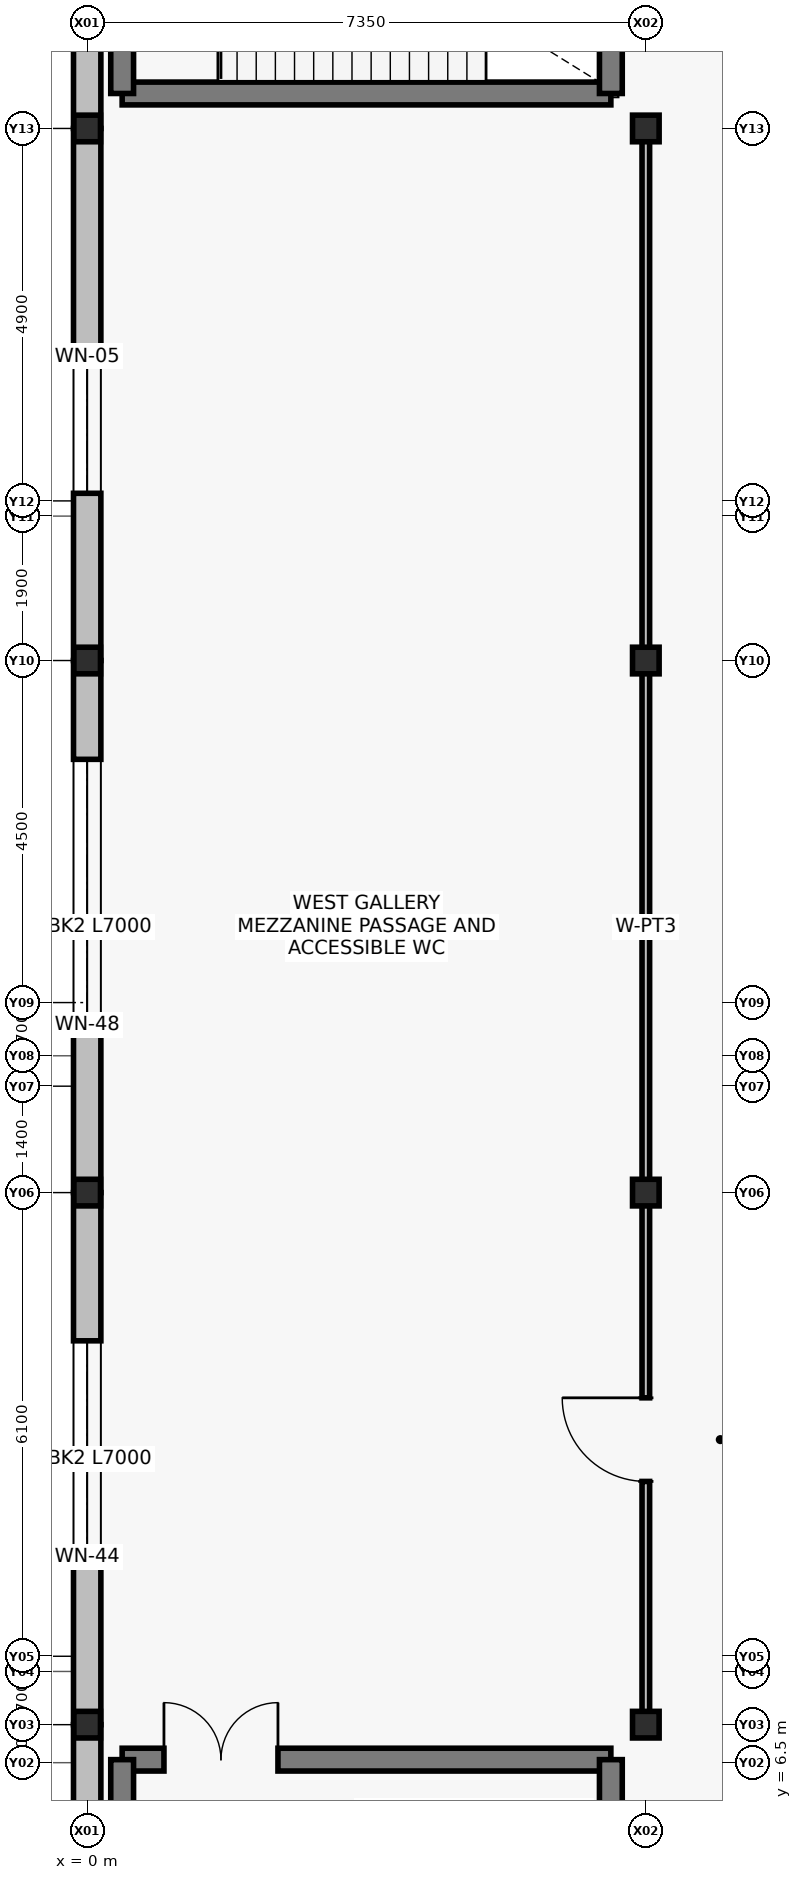
"""IFC4 building model, lengths in metres.
Left out: names, types, materials, properties, quantities, classifications, styles, units other than length and angle.
Written with IfcOpenShell. Run it as: python <this file> out.ifc"""

import sys

from ifc_helpers import new_model, si_unit, direction, frame, frame_2d, origin, origin_2d, place, context, subcontext, project, spatial, rectangle, i_section, extrude, element, fill, save


model = new_model("IFC4")
c1 = context("Model", 3, precision=1e-05, world=origin(), true_north=direction((0.0, 1.0)))
c2 = subcontext(c1, "Body", "Model", "MODEL_VIEW")
j1 = project(units=[si_unit("LENGTHUNIT", "METRE"), si_unit("PLANEANGLEUNIT", "RADIAN")], contexts=[c1])
p1 = place(None, origin())
s1 = spatial("IfcSite", under=j1, at=p1, CompositionType="ELEMENT")
p2 = place(p1, origin())
s2 = spatial("IfcBuilding", under=s1, at=p2, CompositionType="ELEMENT")
p3 = place(p2, frame((0.0, 0.0, 6.0)))
s3 = spatial("IfcBuildingStorey", under=s2, at=p3, CompositionType="ELEMENT", Elevation=6.0)
for number, where, z_axis, x_axis in (
    (1, (0.0, 7.0, 0.0), (0.0, 0.0, 1.0), (1.0, 0.0, 0.0)),
    (2, (0.0, 14.0, 0.0), (0.0, 0.0, 1.0), (1.0, 0.0, 0.0)),
    (3, (0.0, 21.0, 0.0), (0.0, 0.0, 1.0), (1.0, 0.0, 0.0)),
    (4, (0.0, 28.0, 0.0), (0.0, 0.0, 1.0), (1.0, 0.0, 0.0)),
    (5, (7.35, 7.0, 0.0), (0.0, 0.0, 1.0), (1.0, 0.0, 0.0)),
    (6, (7.35, 14.0, 0.0), (0.0, 0.0, 1.0), (1.0, 0.0, 0.0)),
    (7, (7.35, 21.0, 0.0), (0.0, 0.0, 1.0), (1.0, 0.0, 0.0)),
    (8, (7.35, 28.0, 0.0), (0.0, 0.0, 1.0), (1.0, 0.0, 0.0)),
):
    element("IfcColumn", number, at=place(p3, frame(where, z_axis=z_axis, x_axis=x_axis)), inside=s3, PredefinedType="COLUMN", context=c2, shape_type="SweptSolid", body=[
        extrude(i_section(OverallWidth=0.35, OverallDepth=0.35, WebThickness=0.012, FlangeThickness=0.019, at=origin_2d()), origin(), (0.0, 0.0, 1.0), 5.1),
    ])
p4 = place(p3, frame((0.0, 0.0, 0.0), z_axis=(0.0, 0.0, 1.0), x_axis=(0.0, 1.0, 0.0)))
e9 = element("IfcWall", 9, at=p4, inside=s3, PredefinedType="SOLIDWALL", context=c2, shape_type="SweptSolid", body=[
    extrude(rectangle(XDim=7.0, YDim=0.36, at=frame_2d((3.5, 0.0))), origin(), (0.0, 0.0, 1.0), 4.25),
])
p5 = place(p4, frame((2.2, 0.0, 0.95)))
e10 = element("IfcOpeningElement", 10, at=p5, cuts=e9, PredefinedType="OPENING", context=c2, shape_type="SweptSolid", body=[
    extrude(rectangle(XDim=2.15, YDim=1.9, at=frame_2d((1.075, 0.95))), frame((0.0, 0.19, 0.0), z_axis=(0.0, -1.0, 0.0), x_axis=(1.0, 0.0, 0.0)), (0.0, 0.0, 1.0), 0.38),
])
p6 = place(p3, frame((0.0, 7.0, 0.0), z_axis=(0.0, 0.0, 1.0), x_axis=(0.0, 1.0, 0.0)))
e11 = element("IfcWall", 11, at=p6, inside=s3, PredefinedType="SOLIDWALL", context=c2, shape_type="SweptSolid", body=[
    extrude(rectangle(XDim=7.0, YDim=0.36, at=frame_2d((3.5, 0.0))), origin(), (0.0, 0.0, 1.0), 4.25),
])
p7 = place(p6, frame((2.2, 0.0, 0.95)))
e12 = element("IfcOpeningElement", 12, at=p7, cuts=e11, PredefinedType="OPENING", context=c2, shape_type="SweptSolid", body=[
    extrude(rectangle(XDim=2.85, YDim=1.85, at=frame_2d((1.425, 0.925))), frame((0.0, 0.19, 0.0), z_axis=(0.0, -1.0, 0.0), x_axis=(1.0, 0.0, 0.0)), (0.0, 0.0, 1.0), 0.38),
])
p8 = place(p3, frame((0.0, 14.0, 0.0), z_axis=(0.0, 0.0, 1.0), x_axis=(0.0, 1.0, 0.0)))
e13 = element("IfcWall", 13, at=p8, inside=s3, PredefinedType="SOLIDWALL", context=c2, shape_type="SweptSolid", body=[
    extrude(rectangle(XDim=7.0, YDim=0.36, at=frame_2d((3.5, 0.0))), origin(), (0.0, 0.0, 1.0), 4.25),
])
p9 = place(p8, frame((2.2, 0.0, 0.95)))
e14 = element("IfcOpeningElement", 14, at=p9, cuts=e13, PredefinedType="OPENING", context=c2, shape_type="SweptSolid", body=[
    extrude(rectangle(XDim=3.5, YDim=2.0, at=frame_2d((1.75, 1.0))), frame((0.0, 0.19, 0.0), z_axis=(0.0, -1.0, 0.0), x_axis=(1.0, 0.0, 0.0)), (0.0, 0.0, 1.0), 0.38),
])
p10 = place(p3, frame((0.0, 21.0, 0.0), z_axis=(0.0, 0.0, 1.0), x_axis=(0.0, 1.0, 0.0)))
e15 = element("IfcWall", 15, at=p10, inside=s3, PredefinedType="SOLIDWALL", context=c2, shape_type="SweptSolid", body=[
    extrude(rectangle(XDim=7.0, YDim=0.36, at=frame_2d((3.5, 0.0))), origin(), (0.0, 0.0, 1.0), 4.25),
])
p11 = place(p10, frame((2.2, 0.0, 0.95)))
e16 = element("IfcOpeningElement", 16, at=p11, cuts=e15, PredefinedType="OPENING", context=c2, shape_type="SweptSolid", body=[
    extrude(rectangle(XDim=1.8, YDim=1.8, at=frame_2d((0.9, 0.9))), frame((0.0, 0.19, 0.0), z_axis=(0.0, -1.0, 0.0), x_axis=(1.0, 0.0, 0.0)), (0.0, 0.0, 1.0), 0.38),
])
p12 = place(p3, frame((0.0, 28.0, 0.0), z_axis=(0.0, 0.0, 1.0), x_axis=(0.0, 1.0, 0.0)))
e17 = element("IfcWall", 17, at=p12, inside=s3, PredefinedType="SOLIDWALL", context=c2, shape_type="SweptSolid", body=[
    extrude(rectangle(XDim=7.0, YDim=0.36, at=frame_2d((3.5, 0.0))), origin(), (0.0, 0.0, 1.0), 4.25),
])
p13 = place(p12, frame((2.2, 0.0, 0.95)))
e18 = element("IfcOpeningElement", 18, at=p13, cuts=e17, PredefinedType="OPENING", context=c2, shape_type="SweptSolid", body=[
    extrude(rectangle(XDim=2.4, YDim=2.1, at=frame_2d((1.2, 1.05))), frame((0.0, 0.19, 0.0), z_axis=(0.0, -1.0, 0.0), x_axis=(1.0, 0.0, 0.0)), (0.0, 0.0, 1.0), 0.38),
])
p14 = place(p3, frame((0.46, 28.46, 0.0), z_axis=(0.0, 0.0, 1.0), x_axis=(1.0, 0.0, 0.0)))
e19 = element("IfcWall", 19, at=p14, inside=s3, PredefinedType="SHEAR", context=c2, shape_type="SweptSolid", body=[
    extrude(rectangle(XDim=6.43, YDim=0.3, at=frame_2d((3.215, 0.0))), origin(), (0.0, 0.0, 1.0), 4.82),
])
for number, where, z_axis, x_axis in (
    (20, (0.46, 28.46, 0.0), (0.0, 0.0, 1.0), (0.0, 1.0, 0.0)),
    (21, (6.89, 28.46, 0.0), (0.0, 0.0, 1.0), (0.0, 1.0, 0.0)),
):
    element("IfcWall", number, at=place(p3, frame(where, z_axis=z_axis, x_axis=x_axis)), inside=s3, PredefinedType="SHEAR", context=c2, shape_type="SweptSolid", body=[
        extrude(rectangle(XDim=6.08, YDim=0.3, at=frame_2d((3.04, 0.0))), origin(), (0.0, 0.0, 1.0), 4.82),
    ])
p15 = place(p3, frame((0.46, 6.54, 0.0), z_axis=(0.0, 0.0, 1.0), x_axis=(1.0, 0.0, 0.0)))
e22 = element("IfcWall", 22, at=p15, inside=s3, PredefinedType="SHEAR", context=c2, shape_type="SweptSolid", body=[
    extrude(rectangle(XDim=6.43, YDim=0.3, at=frame_2d((3.215, 0.0))), origin(), (0.0, 0.0, 1.0), 4.82),
])
p16 = place(p15, frame((0.55, 0.0, 0.0)))
e23 = element("IfcOpeningElement", 23, at=p16, cuts=e22, PredefinedType="OPENING", context=c2, shape_type="SweptSolid", body=[
    extrude(rectangle(XDim=1.5, YDim=2.2, at=frame_2d((0.75, 1.1))), frame((0.0, 0.16, 0.0), z_axis=(0.0, -1.0, 0.0), x_axis=(1.0, 0.0, 0.0)), (0.0, 0.0, 1.0), 0.32),
])
for number, where, z_axis, x_axis in (
    (24, (0.46, 0.46, 0.0), (0.0, 0.0, 1.0), (0.0, 1.0, 0.0)),
    (25, (6.89, 0.46, 0.0), (0.0, 0.0, 1.0), (0.0, 1.0, 0.0)),
):
    element("IfcWall", number, at=place(p3, frame(where, z_axis=z_axis, x_axis=x_axis)), inside=s3, PredefinedType="SHEAR", context=c2, shape_type="SweptSolid", body=[
        extrude(rectangle(XDim=6.08, YDim=0.3, at=frame_2d((3.04, 0.0))), origin(), (0.0, 0.0, 1.0), 4.82),
    ])
p17 = place(p3, frame((7.35, 7.0, 0.0), z_axis=(0.0, 0.0, 1.0), x_axis=(0.0, 1.0, 0.0)))
e26 = element("IfcWall", 26, at=p17, inside=s3, PredefinedType="PARTITIONING", context=c2, shape_type="SweptSolid", body=[
    extrude(rectangle(XDim=21.0, YDim=0.1, at=frame_2d((10.5, 0.0))), origin(), (0.0, 0.0, 1.0), 4.05),
])
p18 = place(p17, frame((3.2, 0.0, 0.0)))
e27 = element("IfcOpeningElement", 27, at=p18, cuts=e26, PredefinedType="OPENING", context=c2, shape_type="SweptSolid", body=[
    extrude(rectangle(XDim=1.1, YDim=2.1, at=frame_2d((0.55, 1.05))), frame((0.0, 0.06, 0.0), z_axis=(0.0, -1.0, 0.0), x_axis=(1.0, 0.0, 0.0)), (0.0, 0.0, 1.0), 0.12),
])
p19 = place(p7, origin())
e28 = element("IfcWindow", 28, at=p19, inside=s3, PartitioningType="SINGLE_PANEL", PredefinedType="WINDOW", context=c2, shape_type="SweptSolid", body=[
    extrude(rectangle(XDim=2.85, YDim=1.85, at=frame_2d((1.425, 0.925))), frame((0.0, 0.03, 0.0), z_axis=(0.0, -1.0, 0.0), x_axis=(1.0, 0.0, 0.0)), (0.0, 0.0, 1.0), 0.06),
])
fill(e12, e28)
p20 = place(p9, origin())
e29 = element("IfcWindow", 29, at=p20, inside=s3, PartitioningType="SINGLE_PANEL", PredefinedType="WINDOW", context=c2, shape_type="SweptSolid", body=[
    extrude(rectangle(XDim=3.5, YDim=2.0, at=frame_2d((1.75, 1.0))), frame((0.0, 0.03, 0.0), z_axis=(0.0, -1.0, 0.0), x_axis=(1.0, 0.0, 0.0)), (0.0, 0.0, 1.0), 0.06),
])
fill(e14, e29)
p21 = place(p11, origin())
e30 = element("IfcWindow", 30, at=p21, inside=s3, PartitioningType="SINGLE_PANEL", PredefinedType="WINDOW", context=c2, shape_type="SweptSolid", body=[
    extrude(rectangle(XDim=1.8, YDim=1.8, at=frame_2d((0.9, 0.9))), frame((0.0, 0.03, 0.0), z_axis=(0.0, -1.0, 0.0), x_axis=(1.0, 0.0, 0.0)), (0.0, 0.0, 1.0), 0.06),
])
fill(e16, e30)
p22 = place(p16, origin())
e31 = element("IfcDoor", 31, at=p22, inside=s3, OperationType="DOUBLE_DOOR_SINGLE_SWING", PredefinedType="DOOR", context=c2, shape_type="SweptSolid", body=[
    extrude(rectangle(XDim=1.5, YDim=2.2, at=frame_2d((0.75, 1.1))), frame((0.0, 0.025, 0.0), z_axis=(0.0, -1.0, 0.0), x_axis=(1.0, 0.0, 0.0)), (0.0, 0.0, 1.0), 0.05),
])
fill(e23, e31)
p23 = place(p18, origin())
e32 = element("IfcDoor", 32, at=p23, inside=s3, OperationType="SINGLE_SWING_RIGHT", PredefinedType="DOOR", context=c2, shape_type="SweptSolid", body=[
    extrude(rectangle(XDim=1.1, YDim=2.1, at=frame_2d((0.55, 1.05))), frame((0.0, 0.025, 0.0), z_axis=(0.0, -1.0, 0.0), x_axis=(1.0, 0.0, 0.0)), (0.0, 0.0, 1.0), 0.05),
])
fill(e27, e32)
save(model, sys.argv[1])
